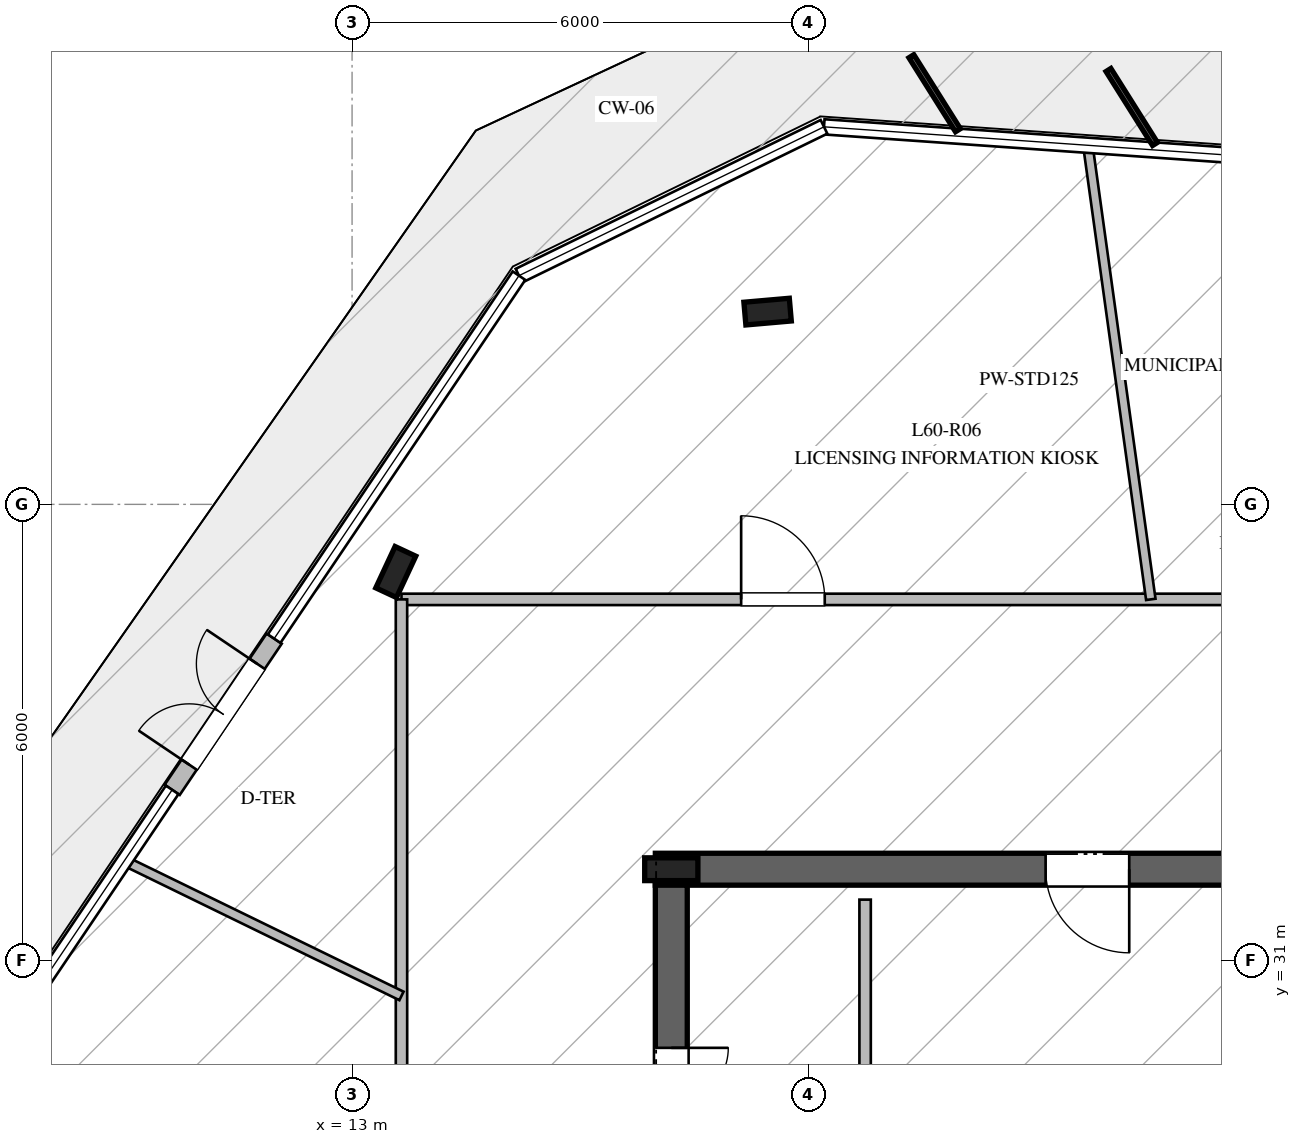
"""IFC4 building model, lengths in metres.
Left out: names, types, materials, properties, quantities, classifications, styles, units other than length and angle.
Written with IfcOpenShell. Run it as: python <this file> out.ifc"""

import sys

from ifc_helpers import new_model, si_unit, direction, frame, frame_2d, origin, origin_2d, place, context, subcontext, project, spatial, rectangle, i_section, extrude, element, fill, save


model = new_model("IFC4")
c1 = context("Model", 3, precision=1e-05, world=origin(), true_north=direction((0.0, 1.0)))
c2 = subcontext(c1, "Body", "Model", "MODEL_VIEW")
j1 = project(units=[si_unit("LENGTHUNIT", "METRE"), si_unit("PLANEANGLEUNIT", "RADIAN")], contexts=[c1])
p1 = place(None, origin())
s1 = spatial("IfcSite", under=j1, at=p1, CompositionType="ELEMENT")
p2 = place(p1, origin())
s2 = spatial("IfcBuilding", under=s1, at=p2, CompositionType="ELEMENT")
p3 = place(p2, frame((0.0, 0.0, 250.2)))
s3 = spatial("IfcBuildingStorey", under=s2, at=p3, CompositionType="ELEMENT", Elevation=250.2)
p4 = place(p3, frame((33.01, 32.2, 0.0), z_axis=(0.0, 0.0, 1.0), x_axis=(-1.0, 0.0, 0.0)))
e1 = element("IfcWall", 1, at=p4, inside=s3, PredefinedType="SHEAR", context=c2, shape_type="SweptSolid", body=[
    extrude(rectangle(XDim=16.02, YDim=0.42, at=frame_2d((8.01, 0.0))), origin(), (0.0, 0.0, 1.0), 3.78),
])
p5 = place(p4, frame((4.96, 0.0, 0.0)))
e2 = element("IfcOpeningElement", 2, at=p5, cuts=e1, PredefinedType="OPENING", context=c2, shape_type="SweptSolid", body=[
    extrude(rectangle(XDim=1.2, YDim=2.25, at=frame_2d((0.6, 1.125))), frame((0.0, 0.22, 0.0), z_axis=(0.0, -1.0, 0.0), x_axis=(1.0, 0.0, 0.0)), (0.0, 0.0, 1.0), 0.44),
])
p6 = place(p4, frame((9.785, 0.0, 0.0)))
e3 = element("IfcOpeningElement", 3, at=p6, cuts=e1, PredefinedType="OPENING", context=c2, shape_type="SweptSolid", body=[
    extrude(rectangle(XDim=1.1, YDim=2.2, at=frame_2d((0.55, 1.1))), frame((0.0, 0.22, 0.0), z_axis=(0.0, -1.0, 0.0), x_axis=(1.0, 0.0, 0.0)), (0.0, 0.0, 1.0), 0.44),
])
p7 = place(p3, frame((17.2, 31.99, 0.0), z_axis=(0.0, 0.0, 1.0), x_axis=(0.0, -1.0, 0.0)))
e4 = element("IfcWall", 4, at=p7, inside=s3, PredefinedType="SHEAR", context=c2, shape_type="SweptSolid", body=[
    extrude(rectangle(XDim=13.98, YDim=0.42, at=frame_2d((6.99, 0.0))), origin(), (0.0, 0.0, 1.0), 3.78),
])
p8 = place(p7, frame((2.14, 0.0, 0.0)))
e5 = element("IfcOpeningElement", 5, at=p8, cuts=e4, PredefinedType="OPENING", context=c2, shape_type="SweptSolid", body=[
    extrude(rectangle(XDim=1.5, YDim=2.2, at=frame_2d((0.75, 1.1))), frame((0.0, 0.22, 0.0), z_axis=(0.0, -1.0, 0.0), x_axis=(1.0, 0.0, 0.0)), (0.0, 0.0, 1.0), 0.44),
])
p9 = place(p3, frame((17.2, 32.2, 0.0), z_axis=(0.0, 0.0, 1.0), x_axis=(1.0, 0.0, 0.0)))
e6 = element("IfcColumn", 6, at=p9, inside=s3, PredefinedType="COLUMN", context=c2, shape_type="SweptSolid", body=[
    extrude(i_section(OverallWidth=0.3, OverallDepth=0.7, WebThickness=0.017, FlangeThickness=0.032, at=origin_2d()), origin(), (0.0, 0.0, 1.0), 4.0),
])
for number, where, z_axis, x_axis in (
    (7, (18.467, 39.536, -0.27), (0.0, 0.0, 1.0), (0.996, 0.087, 0.0)),
    (8, (13.575, 36.11, -0.27), (0.0, 0.0, 1.0), (0.423, 0.906, 0.0)),
):
    element("IfcColumn", number, at=place(p3, frame(where, z_axis=z_axis, x_axis=x_axis)), inside=s3, PredefinedType="COLUMN", context=c2, shape_type="SweptSolid", body=[
        extrude(i_section(OverallWidth=0.3, OverallDepth=0.6, WebThickness=0.015, FlangeThickness=0.03, at=origin_2d()), origin(), (0.0, 0.0, 1.0), 4.27),
    ])
p10 = place(p3, frame((11.975, 35.234, 0.0), z_axis=(0.0, 0.0, 1.0), x_axis=(-0.559128660759, -0.82908090119, 0.0)))
e9 = element("IfcWall", 9, at=p10, inside=s3, PredefinedType="STANDARD", context=c2, shape_type="SweptSolid", body=[
    extrude(rectangle(XDim=2.4, YDim=0.24, at=frame_2d((1.2, 0.0))), origin(), (0.0, 0.0, 1.0), 3.78),
])
p11 = place(p10, frame((0.4, 0.0, 0.0)))
e10 = element("IfcOpeningElement", 10, at=p11, cuts=e9, PredefinedType="OPENING", context=c2, shape_type="SweptSolid", body=[
    extrude(rectangle(XDim=1.6, YDim=2.25, at=frame_2d((0.8, 1.125))), frame((0.0, 0.13, 0.0), z_axis=(0.0, -1.0, 0.0), x_axis=(1.0, 0.0, 0.0)), (0.0, 0.0, 1.0), 0.26),
])
p12 = place(p3, frame((19.75, 29.39, 0.0), z_axis=(0.0, 0.0, 1.0), x_axis=(0.0, 1.0, 0.0)))
e11 = element("IfcWall", 11, at=p12, inside=s3, PredefinedType="PARTITIONING", context=c2, shape_type="SweptSolid", body=[
    extrude(rectangle(XDim=2.41, YDim=0.15, at=frame_2d((1.205, 0.0))), origin(), (0.0, 0.0, 1.0), 3.78),
])
p13 = place(p3, frame((13.65, 35.75, 0.0), z_axis=(0.0, 0.0, 1.0), x_axis=(1.0, 0.0, 0.0)))
e12 = element("IfcWall", 12, at=p13, inside=s3, PredefinedType="PARTITIONING", context=c2, shape_type="SweptSolid", body=[
    extrude(rectangle(XDim=22.7, YDim=0.15, at=frame_2d((11.35, 0.0))), origin(), (0.0, 0.0, 1.0), 3.28),
])
p14 = place(p13, frame((19.122, 0.0, 0.0)))
e13 = element("IfcOpeningElement", 13, at=p14, cuts=e12, PredefinedType="OPENING", context=c2, shape_type="SweptSolid", body=[
    extrude(rectangle(XDim=1.1, YDim=2.2, at=frame_2d((0.55, 1.1))), frame((0.0, 0.085, 0.0), z_axis=(0.0, -1.0, 0.0), x_axis=(1.0, 0.0, 0.0)), (0.0, 0.0, 1.0), 0.17),
])
p15 = place(p13, frame((12.698, 0.0, 0.0)))
e14 = element("IfcOpeningElement", 14, at=p15, cuts=e12, PredefinedType="OPENING", context=c2, shape_type="SweptSolid", body=[
    extrude(rectangle(XDim=1.1, YDim=2.2, at=frame_2d((0.55, 1.1))), frame((0.0, 0.085, 0.0), z_axis=(0.0, -1.0, 0.0), x_axis=(1.0, 0.0, 0.0)), (0.0, 0.0, 1.0), 0.17),
])
p16 = place(p13, frame((4.469, 0.0, 0.0)))
e15 = element("IfcOpeningElement", 15, at=p16, cuts=e12, PredefinedType="OPENING", context=c2, shape_type="SweptSolid", body=[
    extrude(rectangle(XDim=1.1, YDim=2.2, at=frame_2d((0.55, 1.1))), frame((0.0, 0.085, 0.0), z_axis=(0.0, -1.0, 0.0), x_axis=(1.0, 0.0, 0.0)), (0.0, 0.0, 1.0), 0.17),
])
p17 = place(p3, frame((13.65, 14.25, 0.0), z_axis=(0.0, 0.0, 1.0), x_axis=(0.0, 1.0, 0.0)))
e16 = element("IfcWall", 16, at=p17, inside=s3, PredefinedType="PARTITIONING", context=c2, shape_type="SweptSolid", body=[
    extrude(rectangle(XDim=21.5, YDim=0.15, at=frame_2d((10.75, 0.0))), origin(), (0.0, 0.0, 1.0), 3.25),
])
p18 = place(p17, frame((10.11, 0.0, 0.0)))
e17 = element("IfcOpeningElement", 17, at=p18, cuts=e16, PredefinedType="OPENING", context=c2, shape_type="SweptSolid", body=[
    extrude(rectangle(XDim=1.1, YDim=2.2, at=frame_2d((0.55, 1.1))), frame((0.0, 0.085, 0.0), z_axis=(0.0, -1.0, 0.0), x_axis=(1.0, 0.0, 0.0)), (0.0, 0.0, 1.0), 0.17),
])
p19 = place(p3, frame((23.509, 35.75, 0.0), z_axis=(0.0, 0.0, 1.0), x_axis=(-0.137333830572, 0.990524819972, 0.0)))
e18 = element("IfcWall", 18, at=p19, inside=s3, PredefinedType="PARTITIONING", context=c2, shape_type="SweptSolid", body=[
    extrude(rectangle(XDim=6.014, YDim=0.125, at=frame_2d((3.007, 0.0))), origin(), (0.0, 0.0, 1.0), 3.28),
])
p20 = place(p3, frame((13.65, 30.533, 0.0), z_axis=(0.0, 0.0, 1.0), x_axis=(-0.898829990628, 0.438297442324, 0.0)))
e19 = element("IfcWall", 19, at=p20, inside=s3, PredefinedType="PARTITIONING", context=c2, shape_type="SweptSolid", body=[
    extrude(rectangle(XDim=4.041, YDim=0.125, at=frame_2d((2.02, 0.0))), origin(), (0.0, 0.0, 1.0), 3.28),
])
p21 = place(p11, frame((1.6, 0.0, 0.0), z_axis=(0.0, 0.0, 1.0), x_axis=(-1.0, 0.0, 0.0)))
e20 = element("IfcDoor", 20, at=p21, inside=s3, OperationType="DOUBLE_DOOR_SINGLE_SWING", PredefinedType="DOOR", context=c2, shape_type="SweptSolid", body=[
    extrude(rectangle(XDim=1.6, YDim=2.25, at=frame_2d((0.8, 1.125))), frame((0.0, 0.025, 0.0), z_axis=(0.0, -1.0, 0.0), x_axis=(1.0, 0.0, 0.0)), (0.0, 0.0, 1.0), 0.05),
])
fill(e10, e20)
p22 = place(p8, origin())
e21 = element("IfcDoor", 21, at=p22, inside=s3, OperationType="DOUBLE_DOOR_SINGLE_SWING", PredefinedType="DOOR", context=c2, shape_type="SweptSolid", body=[
    extrude(rectangle(XDim=1.5, YDim=2.2, at=frame_2d((0.75, 1.1))), frame((0.0, 0.025, 0.0), z_axis=(0.0, -1.0, 0.0), x_axis=(1.0, 0.0, 0.0)), (0.0, 0.0, 1.0), 0.05),
])
fill(e5, e21)
p23 = place(p6, origin())
e22 = element("IfcDoor", 22, at=p23, inside=s3, OperationType="SINGLE_SWING_LEFT", PredefinedType="DOOR", context=c2, shape_type="SweptSolid", body=[
    extrude(rectangle(XDim=1.1, YDim=2.2, at=frame_2d((0.55, 1.1))), frame((0.0, 0.025, 0.0), z_axis=(0.0, -1.0, 0.0), x_axis=(1.0, 0.0, 0.0)), (0.0, 0.0, 1.0), 0.05),
])
fill(e3, e22)
p24 = place(p16, origin())
e23 = element("IfcDoor", 23, at=p24, inside=s3, OperationType="SINGLE_SWING_LEFT", PredefinedType="DOOR", context=c2, shape_type="SweptSolid", body=[
    extrude(rectangle(XDim=1.1, YDim=2.2, at=frame_2d((0.55, 1.1))), frame((0.0, 0.025, 0.0), z_axis=(0.0, -1.0, 0.0), x_axis=(1.0, 0.0, 0.0)), (0.0, 0.0, 1.0), 0.05),
])
fill(e15, e23)
save(model, sys.argv[1])
